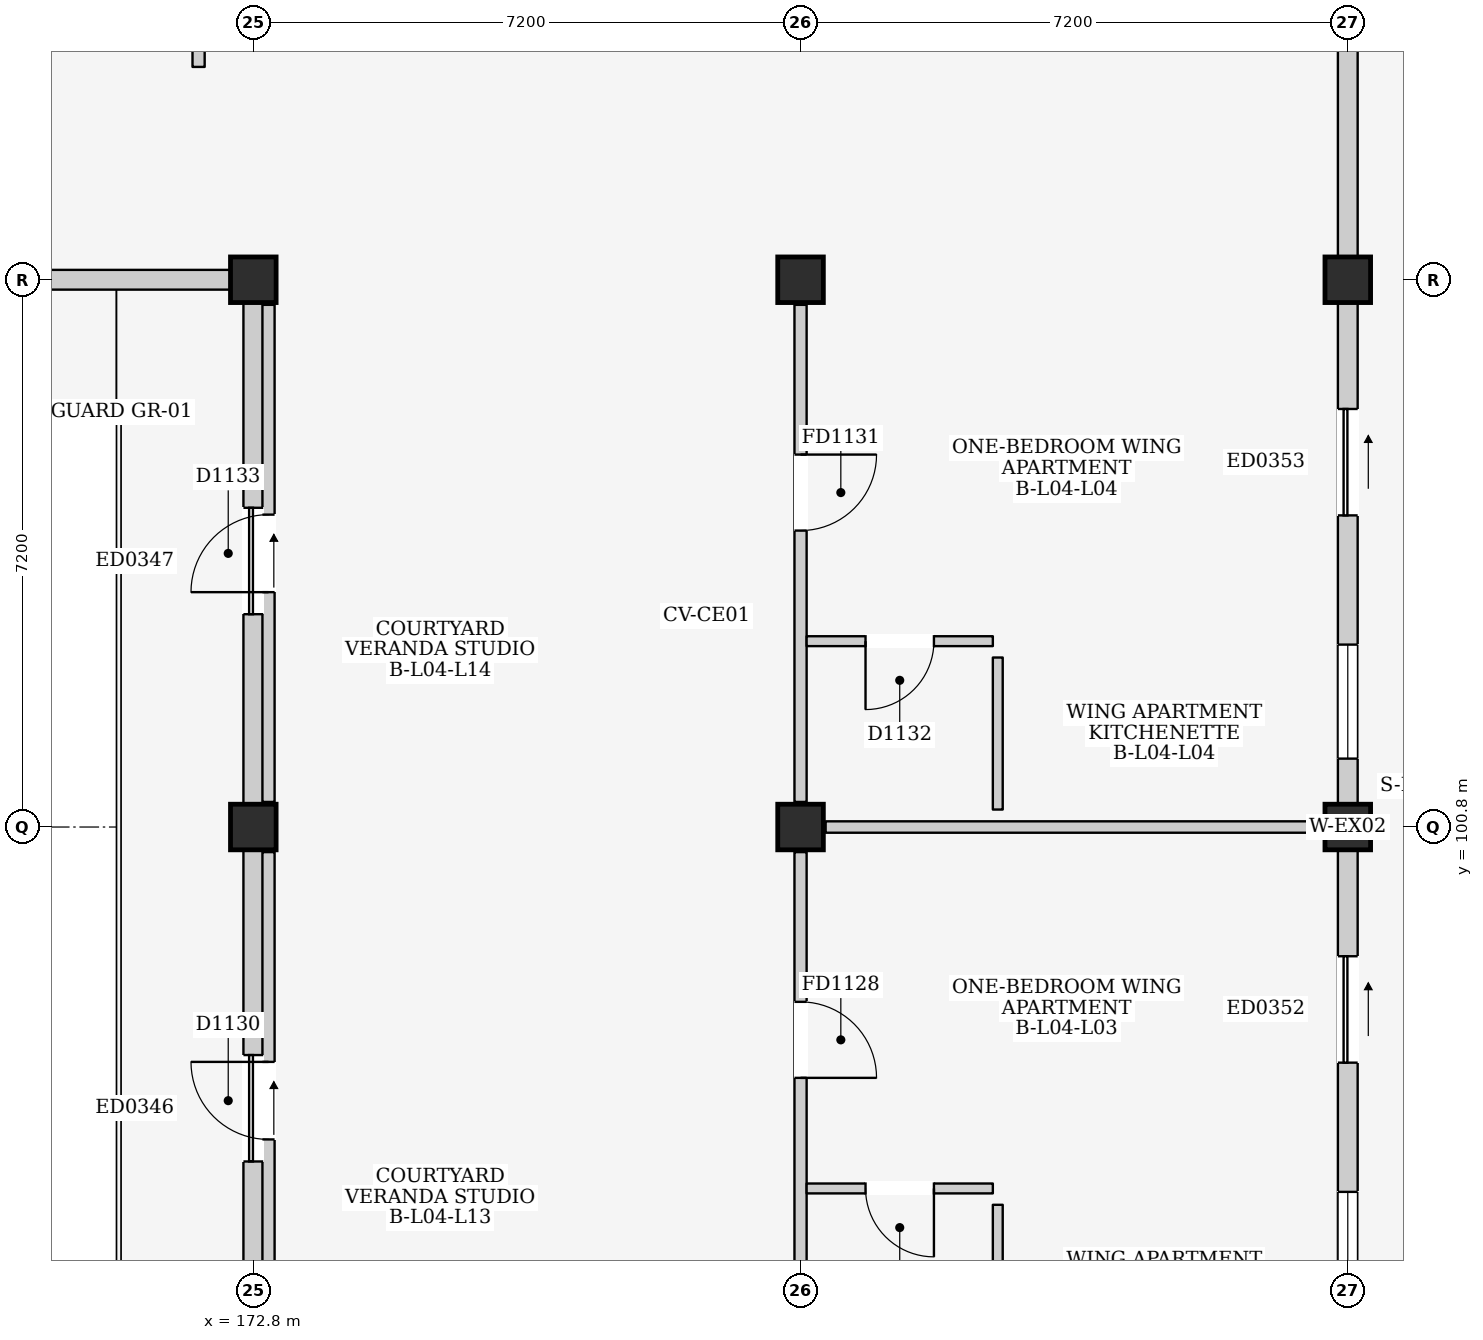
"""IFC4 building model, lengths in metres.
Left out: names, types, materials, properties, quantities, classifications, styles, units other than length and angle.
Written with IfcOpenShell. Run it as: python <this file> out.ifc"""

import sys

from ifc_helpers import new_model, si_unit, direction, frame, frame_2d, origin, origin_2d, place, context, subcontext, project, spatial, rectangle, extrude, element, fill, save


model = new_model("IFC4")
c1 = context("Model", 3, precision=1e-05, world=origin(), true_north=direction((0.0, 1.0)))
c2 = subcontext(c1, "Body", "Model", "MODEL_VIEW")
j1 = project(units=[si_unit("LENGTHUNIT", "METRE"), si_unit("PLANEANGLEUNIT", "RADIAN")], contexts=[c1])
p1 = place(None, origin())
s1 = spatial("IfcSite", under=j1, at=p1, CompositionType="ELEMENT")
p2 = place(p1, origin())
s2 = spatial("IfcBuilding", under=s1, at=p2, CompositionType="ELEMENT")
p3 = place(p2, frame((0.0, 0.0, 15.4)))
s3 = spatial("IfcBuildingStorey", under=s2, at=p3, CompositionType="ELEMENT", Elevation=15.4)
for number, where, z_axis, x_axis in (
    (1, (172.8, 100.8, 0.0), (0.0, 0.0, 1.0), (1.0, 0.0, 0.0)),
    (2, (172.8, 108.0, 0.0), (0.0, 0.0, 1.0), (1.0, 0.0, 0.0)),
    (3, (180.0, 100.8, 0.0), (0.0, 0.0, 1.0), (1.0, 0.0, 0.0)),
    (4, (180.0, 108.0, 0.0), (0.0, 0.0, 1.0), (1.0, 0.0, 0.0)),
    (5, (187.2, 100.8, 0.0), (0.0, 0.0, 1.0), (1.0, 0.0, 0.0)),
    (6, (187.2, 108.0, 0.0), (0.0, 0.0, 1.0), (1.0, 0.0, 0.0)),
):
    element("IfcColumn", number, at=place(p3, frame(where, z_axis=z_axis, x_axis=x_axis)), inside=s3, PredefinedType="COLUMN", context=c2, shape_type="SweptSolid", body=[
        extrude(rectangle(XDim=0.6, YDim=0.6, at=origin_2d()), origin(), (0.0, 0.0, 1.0), 3.2),
    ])
p4 = place(p3, frame((165.9, 108.0, 0.0), z_axis=(0.0, 0.0, 1.0), x_axis=(1.0, 0.0, 0.0)))
e7 = element("IfcWall", 7, at=p4, inside=s3, PredefinedType="ELEMENTEDWALL", context=c2, shape_type="SweptSolid", body=[
    extrude(rectangle(XDim=6.6, YDim=0.26, at=frame_2d((3.3, 0.0))), origin(), (0.0, 0.0, 1.0), 2.335),
])
p5 = place(p4, frame((2.8, 0.0, 1.2)))
e8 = element("IfcOpeningElement", 8, at=p5, cuts=e7, PredefinedType="OPENING", context=c2, shape_type="SweptSolid", body=[
    extrude(rectangle(XDim=1.0, YDim=0.9, at=frame_2d((0.5, 0.45))), frame((0.0, 0.145, 0.0), z_axis=(0.0, -1.0, 0.0), x_axis=(1.0, 0.0, 0.0)), (0.0, 0.0, 1.0), 0.29),
])
p6 = place(p3, frame((172.8, 93.9, 0.0), z_axis=(0.0, 0.0, 1.0), x_axis=(0.0, 1.0, 0.0)))
e9 = element("IfcWall", 9, at=p6, inside=s3, PredefinedType="ELEMENTEDWALL", context=c2, shape_type="SweptSolid", body=[
    extrude(rectangle(XDim=6.6, YDim=0.26, at=frame_2d((3.3, 0.0))), origin(), (0.0, 0.0, 1.0), 2.385),
])
p7 = place(p6, frame((2.5, 0.0, 0.0)))
e10 = element("IfcOpeningElement", 10, at=p7, cuts=e9, PredefinedType="OPENING", context=c2, shape_type="SweptSolid", body=[
    extrude(rectangle(XDim=1.4, YDim=2.1, at=frame_2d((0.7, 1.05))), frame((0.0, 0.145, 0.0), z_axis=(0.0, -1.0, 0.0), x_axis=(1.0, 0.0, 0.0)), (0.0, 0.0, 1.0), 0.29),
])
p8 = place(p3, frame((172.8, 101.1, 0.0), z_axis=(0.0, 0.0, 1.0), x_axis=(0.0, 1.0, 0.0)))
e11 = element("IfcWall", 11, at=p8, inside=s3, PredefinedType="ELEMENTEDWALL", context=c2, shape_type="SweptSolid", body=[
    extrude(rectangle(XDim=6.6, YDim=0.26, at=frame_2d((3.3, 0.0))), origin(), (0.0, 0.0, 1.0), 2.385),
])
p9 = place(p8, frame((2.5, 0.0, 0.0)))
e12 = element("IfcOpeningElement", 12, at=p9, cuts=e11, PredefinedType="OPENING", context=c2, shape_type="SweptSolid", body=[
    extrude(rectangle(XDim=1.4, YDim=2.1, at=frame_2d((0.7, 1.05))), frame((0.0, 0.145, 0.0), z_axis=(0.0, -1.0, 0.0), x_axis=(1.0, 0.0, 0.0)), (0.0, 0.0, 1.0), 0.29),
])
p10 = place(p3, frame((187.2, 93.9, 0.0), z_axis=(0.0, 0.0, 1.0), x_axis=(0.0, 1.0, 0.0)))
e13 = element("IfcWall", 13, at=p10, inside=s3, PredefinedType="ELEMENTEDWALL", context=c2, shape_type="SweptSolid", body=[
    extrude(rectangle(XDim=6.6, YDim=0.26, at=frame_2d((3.3, 0.0))), origin(), (0.0, 0.0, 1.0), 2.43),
])
p11 = place(p10, frame((3.8, 0.0, 0.0)))
e14 = element("IfcOpeningElement", 14, at=p11, cuts=e13, PredefinedType="OPENING", context=c2, shape_type="SweptSolid", body=[
    extrude(rectangle(XDim=1.4, YDim=2.1, at=frame_2d((0.7, 1.05))), frame((0.0, 0.145, 0.0), z_axis=(0.0, -1.0, 0.0), x_axis=(1.0, 0.0, 0.0)), (0.0, 0.0, 1.0), 0.29),
])
p12 = place(p10, frame((0.6, 0.0, 0.81)))
e15 = element("IfcOpeningElement", 15, at=p12, cuts=e13, PredefinedType="OPENING", context=c2, shape_type="SweptSolid", body=[
    extrude(rectangle(XDim=1.5, YDim=1.5, at=frame_2d((0.75, 0.75))), frame((0.0, 0.145, 0.0), z_axis=(0.0, -1.0, 0.0), x_axis=(1.0, 0.0, 0.0)), (0.0, 0.0, 1.0), 0.29),
])
p13 = place(p3, frame((187.2, 101.1, 0.0), z_axis=(0.0, 0.0, 1.0), x_axis=(0.0, 1.0, 0.0)))
e16 = element("IfcWall", 16, at=p13, inside=s3, PredefinedType="ELEMENTEDWALL", context=c2, shape_type="SweptSolid", body=[
    extrude(rectangle(XDim=6.6, YDim=0.26, at=frame_2d((3.3, 0.0))), origin(), (0.0, 0.0, 1.0), 2.43),
])
p14 = place(p13, frame((3.8, 0.0, 0.0)))
e17 = element("IfcOpeningElement", 17, at=p14, cuts=e16, PredefinedType="OPENING", context=c2, shape_type="SweptSolid", body=[
    extrude(rectangle(XDim=1.4, YDim=2.1, at=frame_2d((0.7, 1.05))), frame((0.0, 0.145, 0.0), z_axis=(0.0, -1.0, 0.0), x_axis=(1.0, 0.0, 0.0)), (0.0, 0.0, 1.0), 0.29),
])
p15 = place(p13, frame((0.6, 0.0, 0.81)))
e18 = element("IfcOpeningElement", 18, at=p15, cuts=e16, PredefinedType="OPENING", context=c2, shape_type="SweptSolid", body=[
    extrude(rectangle(XDim=1.5, YDim=1.5, at=frame_2d((0.75, 0.75))), frame((0.0, 0.145, 0.0), z_axis=(0.0, -1.0, 0.0), x_axis=(1.0, 0.0, 0.0)), (0.0, 0.0, 1.0), 0.29),
])
p16 = place(p3, frame((187.2, 108.3, 0.0), z_axis=(0.0, 0.0, 1.0), x_axis=(0.0, 1.0, 0.0)))
e19 = element("IfcWall", 19, at=p16, inside=s3, PredefinedType="ELEMENTEDWALL", context=c2, shape_type="SweptSolid", body=[
    extrude(rectangle(XDim=6.6, YDim=0.26, at=frame_2d((3.3, 0.0))), origin(), (0.0, 0.0, 1.0), 2.43),
])
p17 = place(p16, frame((3.65, 0.0, 0.0)))
e20 = element("IfcOpeningElement", 20, at=p17, cuts=e19, PredefinedType="OPENING", context=c2, shape_type="SweptSolid", body=[
    extrude(rectangle(XDim=1.4, YDim=2.1, at=frame_2d((0.7, 1.05))), frame((0.0, 0.145, 0.0), z_axis=(0.0, -1.0, 0.0), x_axis=(1.0, 0.0, 0.0)), (0.0, 0.0, 1.0), 0.29),
])
p18 = place(p3, frame((172.08, 110.8, 0.0), z_axis=(0.0, 0.0, 1.0), x_axis=(0.0, 1.0, 0.0)))
e21 = element("IfcWall", 21, at=p18, inside=s3, PredefinedType="PARTITIONING", context=c2, shape_type="SweptSolid", body=[
    extrude(rectangle(XDim=4.32, YDim=0.16, at=frame_2d((2.16, 0.0))), origin(), (0.0, 0.0, 1.0), 2.95),
])
p19 = place(p18, frame((2.4, 0.0, 0.0)))
e22 = element("IfcOpeningElement", 22, at=p19, cuts=e21, PredefinedType="OPENING", context=c2, shape_type="SweptSolid", body=[
    extrude(rectangle(XDim=1.2, YDim=2.2, at=frame_2d((0.6, 1.1))), frame((0.0, 0.095, 0.0), z_axis=(0.0, -1.0, 0.0), x_axis=(1.0, 0.0, 0.0)), (0.0, 0.0, 1.0), 0.19),
])
p20 = place(p3, frame((180.0, 93.93, 0.0), z_axis=(0.0, 0.0, 1.0), x_axis=(0.0, 1.0, 0.0)))
e23 = element("IfcWall", 23, at=p20, inside=s3, PredefinedType="PARTITIONING", context=c2, shape_type="SweptSolid", body=[
    extrude(rectangle(XDim=6.54, YDim=0.16, at=frame_2d((3.27, 0.0))), origin(), (0.0, 0.0, 1.0), 2.385),
])
p21 = place(p20, frame((3.57, 0.0, 0.0)))
e24 = element("IfcOpeningElement", 24, at=p21, cuts=e23, PredefinedType="OPENING", context=c2, shape_type="SweptSolid", body=[
    extrude(rectangle(XDim=1.0, YDim=2.15, at=frame_2d((0.5, 1.075))), frame((0.0, 0.095, 0.0), z_axis=(0.0, -1.0, 0.0), x_axis=(1.0, 0.0, 0.0)), (0.0, 0.0, 1.0), 0.19),
])
p22 = place(p3, frame((180.33, 100.8, 0.0), z_axis=(0.0, 0.0, 1.0), x_axis=(1.0, 0.0, 0.0)))
e25 = element("IfcWall", 25, at=p22, inside=s3, PredefinedType="PARTITIONING", context=c2, shape_type="SweptSolid", body=[
    extrude(rectangle(XDim=6.54, YDim=0.15, at=frame_2d((3.27, 0.0))), origin(), (0.0, 0.0, 1.0), 2.335),
])
p23 = place(p3, frame((180.08, 96.045, 0.0), z_axis=(0.0, 0.0, 1.0), x_axis=(1.0, 0.0, 0.0)))
e26 = element("IfcWall", 26, at=p23, inside=s3, PredefinedType="PARTITIONING", context=c2, shape_type="SweptSolid", body=[
    extrude(rectangle(XDim=2.45, YDim=0.13, at=frame_2d((1.225, 0.0))), origin(), (0.0, 0.0, 1.0), 2.95),
])
p24 = place(p23, frame((0.775, 0.0, 0.0)))
e27 = element("IfcOpeningElement", 27, at=p24, cuts=e26, PredefinedType="OPENING", context=c2, shape_type="SweptSolid", body=[
    extrude(rectangle(XDim=0.9, YDim=2.1, at=frame_2d((0.45, 1.05))), frame((0.0, 0.08, 0.0), z_axis=(0.0, -1.0, 0.0), x_axis=(1.0, 0.0, 0.0)), (0.0, 0.0, 1.0), 0.16),
])
p25 = place(p3, frame((182.595, 93.83, 0.0), z_axis=(0.0, 0.0, 1.0), x_axis=(0.0, 1.0, 0.0)))
e28 = element("IfcWall", 28, at=p25, inside=s3, PredefinedType="PARTITIONING", context=c2, shape_type="SweptSolid", body=[
    extrude(rectangle(XDim=2.0, YDim=0.13, at=frame_2d((1.0, 0.0))), origin(), (0.0, 0.0, 1.0), 2.95),
])
p26 = place(p3, frame((173.0, 93.93, 0.0), z_axis=(0.0, 0.0, 1.0), x_axis=(0.0, 1.0, 0.0)))
e29 = element("IfcWall", 29, at=p26, inside=s3, PredefinedType="PARTITIONING", context=c2, shape_type="SweptSolid", body=[
    extrude(rectangle(XDim=6.54, YDim=0.16, at=frame_2d((3.27, 0.0))), origin(), (0.0, 0.0, 1.0), 2.385),
])
p27 = place(p26, frame((2.76, 0.0, 0.0)))
e30 = element("IfcOpeningElement", 30, at=p27, cuts=e29, PredefinedType="OPENING", context=c2, shape_type="SweptSolid", body=[
    extrude(rectangle(XDim=1.02, YDim=2.18, at=frame_2d((0.51, 1.09))), frame((0.0, 0.095, 0.0), z_axis=(0.0, -1.0, 0.0), x_axis=(1.0, 0.0, 0.0)), (0.0, 0.0, 1.0), 0.19),
])
p28 = place(p3, frame((180.0, 101.13, 0.0), z_axis=(0.0, 0.0, 1.0), x_axis=(0.0, 1.0, 0.0)))
e31 = element("IfcWall", 31, at=p28, inside=s3, PredefinedType="PARTITIONING", context=c2, shape_type="SweptSolid", body=[
    extrude(rectangle(XDim=6.54, YDim=0.16, at=frame_2d((3.27, 0.0))), origin(), (0.0, 0.0, 1.0), 2.385),
])
p29 = place(p28, frame((3.57, 0.0, 0.0)))
e32 = element("IfcOpeningElement", 32, at=p29, cuts=e31, PredefinedType="OPENING", context=c2, shape_type="SweptSolid", body=[
    extrude(rectangle(XDim=1.0, YDim=2.15, at=frame_2d((0.5, 1.075))), frame((0.0, 0.095, 0.0), z_axis=(0.0, -1.0, 0.0), x_axis=(1.0, 0.0, 0.0)), (0.0, 0.0, 1.0), 0.19),
])
p30 = place(p3, frame((180.08, 103.245, 0.0), z_axis=(0.0, 0.0, 1.0), x_axis=(1.0, 0.0, 0.0)))
e33 = element("IfcWall", 33, at=p30, inside=s3, PredefinedType="PARTITIONING", context=c2, shape_type="SweptSolid", body=[
    extrude(rectangle(XDim=2.45, YDim=0.13, at=frame_2d((1.225, 0.0))), origin(), (0.0, 0.0, 1.0), 2.95),
])
p31 = place(p30, frame((0.775, 0.0, 0.0)))
e34 = element("IfcOpeningElement", 34, at=p31, cuts=e33, PredefinedType="OPENING", context=c2, shape_type="SweptSolid", body=[
    extrude(rectangle(XDim=0.9, YDim=2.1, at=frame_2d((0.45, 1.05))), frame((0.0, 0.08, 0.0), z_axis=(0.0, -1.0, 0.0), x_axis=(1.0, 0.0, 0.0)), (0.0, 0.0, 1.0), 0.16),
])
p32 = place(p3, frame((182.595, 101.03, 0.0), z_axis=(0.0, 0.0, 1.0), x_axis=(0.0, 1.0, 0.0)))
e35 = element("IfcWall", 35, at=p32, inside=s3, PredefinedType="PARTITIONING", context=c2, shape_type="SweptSolid", body=[
    extrude(rectangle(XDim=2.0, YDim=0.13, at=frame_2d((1.0, 0.0))), origin(), (0.0, 0.0, 1.0), 2.95),
])
p33 = place(p3, frame((173.0, 101.13, 0.0), z_axis=(0.0, 0.0, 1.0), x_axis=(0.0, 1.0, 0.0)))
e36 = element("IfcWall", 36, at=p33, inside=s3, PredefinedType="PARTITIONING", context=c2, shape_type="SweptSolid", body=[
    extrude(rectangle(XDim=6.54, YDim=0.16, at=frame_2d((3.27, 0.0))), origin(), (0.0, 0.0, 1.0), 2.385),
])
p34 = place(p33, frame((2.76, 0.0, 0.0)))
e37 = element("IfcOpeningElement", 37, at=p34, cuts=e36, PredefinedType="OPENING", context=c2, shape_type="SweptSolid", body=[
    extrude(rectangle(XDim=1.02, YDim=2.18, at=frame_2d((0.51, 1.09))), frame((0.0, 0.095, 0.0), z_axis=(0.0, -1.0, 0.0), x_axis=(1.0, 0.0, 0.0)), (0.0, 0.0, 1.0), 0.19),
])
p35 = place(p7, frame((1.4, 0.0, 0.0), z_axis=(0.0, 0.0, 1.0), x_axis=(-1.0, 0.0, 0.0)))
e38 = element("IfcDoor", 38, at=p35, inside=s3, OperationType="SLIDING_TO_RIGHT", PredefinedType="DOOR", context=c2, shape_type="SweptSolid", body=[
    extrude(rectangle(XDim=1.4, YDim=2.1, at=frame_2d((0.7, 1.05))), frame((0.0, 0.025, 0.0), z_axis=(0.0, -1.0, 0.0), x_axis=(1.0, 0.0, 0.0)), (0.0, 0.0, 1.0), 0.05),
])
fill(e10, e38)
p36 = place(p9, frame((1.4, 0.0, 0.0), z_axis=(0.0, 0.0, 1.0), x_axis=(-1.0, 0.0, 0.0)))
e39 = element("IfcDoor", 39, at=p36, inside=s3, OperationType="SLIDING_TO_RIGHT", PredefinedType="DOOR", context=c2, shape_type="SweptSolid", body=[
    extrude(rectangle(XDim=1.4, YDim=2.1, at=frame_2d((0.7, 1.05))), frame((0.0, 0.025, 0.0), z_axis=(0.0, -1.0, 0.0), x_axis=(1.0, 0.0, 0.0)), (0.0, 0.0, 1.0), 0.05),
])
fill(e12, e39)
p37 = place(p11, frame((1.4, 0.0, 0.0), z_axis=(0.0, 0.0, 1.0), x_axis=(-1.0, 0.0, 0.0)))
e40 = element("IfcDoor", 40, at=p37, inside=s3, OperationType="SLIDING_TO_RIGHT", PredefinedType="DOOR", context=c2, shape_type="SweptSolid", body=[
    extrude(rectangle(XDim=1.4, YDim=2.1, at=frame_2d((0.7, 1.05))), frame((0.0, 0.025, 0.0), z_axis=(0.0, -1.0, 0.0), x_axis=(1.0, 0.0, 0.0)), (0.0, 0.0, 1.0), 0.05),
])
fill(e14, e40)
p38 = place(p12, origin())
e41 = element("IfcWindow", 41, at=p38, inside=s3, PartitioningType="DOUBLE_PANEL_VERTICAL", PredefinedType="WINDOW", context=c2, shape_type="SweptSolid", body=[
    extrude(rectangle(XDim=1.5, YDim=1.5, at=frame_2d((0.75, 0.75))), frame((0.0, 0.03, 0.0), z_axis=(0.0, -1.0, 0.0), x_axis=(1.0, 0.0, 0.0)), (0.0, 0.0, 1.0), 0.06),
])
fill(e15, e41)
p39 = place(p14, frame((1.4, 0.0, 0.0), z_axis=(0.0, 0.0, 1.0), x_axis=(-1.0, 0.0, 0.0)))
e42 = element("IfcDoor", 42, at=p39, inside=s3, OperationType="SLIDING_TO_RIGHT", PredefinedType="DOOR", context=c2, shape_type="SweptSolid", body=[
    extrude(rectangle(XDim=1.4, YDim=2.1, at=frame_2d((0.7, 1.05))), frame((0.0, 0.025, 0.0), z_axis=(0.0, -1.0, 0.0), x_axis=(1.0, 0.0, 0.0)), (0.0, 0.0, 1.0), 0.05),
])
fill(e17, e42)
p40 = place(p15, origin())
e43 = element("IfcWindow", 43, at=p40, inside=s3, PartitioningType="DOUBLE_PANEL_VERTICAL", PredefinedType="WINDOW", context=c2, shape_type="SweptSolid", body=[
    extrude(rectangle(XDim=1.5, YDim=1.5, at=frame_2d((0.75, 0.75))), frame((0.0, 0.03, 0.0), z_axis=(0.0, -1.0, 0.0), x_axis=(1.0, 0.0, 0.0)), (0.0, 0.0, 1.0), 0.06),
])
fill(e18, e43)
p41 = place(p21, frame((1.0, 0.0, 0.0), z_axis=(0.0, 0.0, 1.0), x_axis=(-1.0, 0.0, 0.0)))
e44 = element("IfcDoor", 44, at=p41, inside=s3, OperationType="SINGLE_SWING_RIGHT", PredefinedType="DOOR", context=c2, shape_type="SweptSolid", body=[
    extrude(rectangle(XDim=1.0, YDim=2.15, at=frame_2d((0.5, 1.075))), frame((0.0, 0.025, 0.0), z_axis=(0.0, -1.0, 0.0), x_axis=(1.0, 0.0, 0.0)), (0.0, 0.0, 1.0), 0.05),
])
fill(e24, e44)
p42 = place(p24, frame((0.9, 0.0, 0.0), z_axis=(0.0, 0.0, 1.0), x_axis=(-1.0, 0.0, 0.0)))
e45 = element("IfcDoor", 45, at=p42, inside=s3, OperationType="SINGLE_SWING_LEFT", PredefinedType="DOOR", context=c2, shape_type="SweptSolid", body=[
    extrude(rectangle(XDim=0.9, YDim=2.1, at=frame_2d((0.45, 1.05))), frame((0.0, 0.025, 0.0), z_axis=(0.0, -1.0, 0.0), x_axis=(1.0, 0.0, 0.0)), (0.0, 0.0, 1.0), 0.05),
])
fill(e27, e45)
p43 = place(p27, origin())
e46 = element("IfcDoor", 46, at=p43, inside=s3, OperationType="SINGLE_SWING_RIGHT", PredefinedType="DOOR", context=c2, shape_type="SweptSolid", body=[
    extrude(rectangle(XDim=1.02, YDim=2.18, at=frame_2d((0.51, 1.09))), frame((0.0, 0.025, 0.0), z_axis=(0.0, -1.0, 0.0), x_axis=(1.0, 0.0, 0.0)), (0.0, 0.0, 1.0), 0.05),
])
fill(e30, e46)
p44 = place(p29, frame((1.0, 0.0, 0.0), z_axis=(0.0, 0.0, 1.0), x_axis=(-1.0, 0.0, 0.0)))
e47 = element("IfcDoor", 47, at=p44, inside=s3, OperationType="SINGLE_SWING_LEFT", PredefinedType="DOOR", context=c2, shape_type="SweptSolid", body=[
    extrude(rectangle(XDim=1.0, YDim=2.15, at=frame_2d((0.5, 1.075))), frame((0.0, 0.025, 0.0), z_axis=(0.0, -1.0, 0.0), x_axis=(1.0, 0.0, 0.0)), (0.0, 0.0, 1.0), 0.05),
])
fill(e32, e47)
p45 = place(p31, frame((0.9, 0.0, 0.0), z_axis=(0.0, 0.0, 1.0), x_axis=(-1.0, 0.0, 0.0)))
e48 = element("IfcDoor", 48, at=p45, inside=s3, OperationType="SINGLE_SWING_RIGHT", PredefinedType="DOOR", context=c2, shape_type="SweptSolid", body=[
    extrude(rectangle(XDim=0.9, YDim=2.1, at=frame_2d((0.45, 1.05))), frame((0.0, 0.025, 0.0), z_axis=(0.0, -1.0, 0.0), x_axis=(1.0, 0.0, 0.0)), (0.0, 0.0, 1.0), 0.05),
])
fill(e34, e48)
p46 = place(p34, origin())
e49 = element("IfcDoor", 49, at=p46, inside=s3, OperationType="SINGLE_SWING_LEFT", PredefinedType="DOOR", context=c2, shape_type="SweptSolid", body=[
    extrude(rectangle(XDim=1.02, YDim=2.18, at=frame_2d((0.51, 1.09))), frame((0.0, 0.025, 0.0), z_axis=(0.0, -1.0, 0.0), x_axis=(1.0, 0.0, 0.0)), (0.0, 0.0, 1.0), 0.05),
])
fill(e37, e49)
save(model, sys.argv[1])
